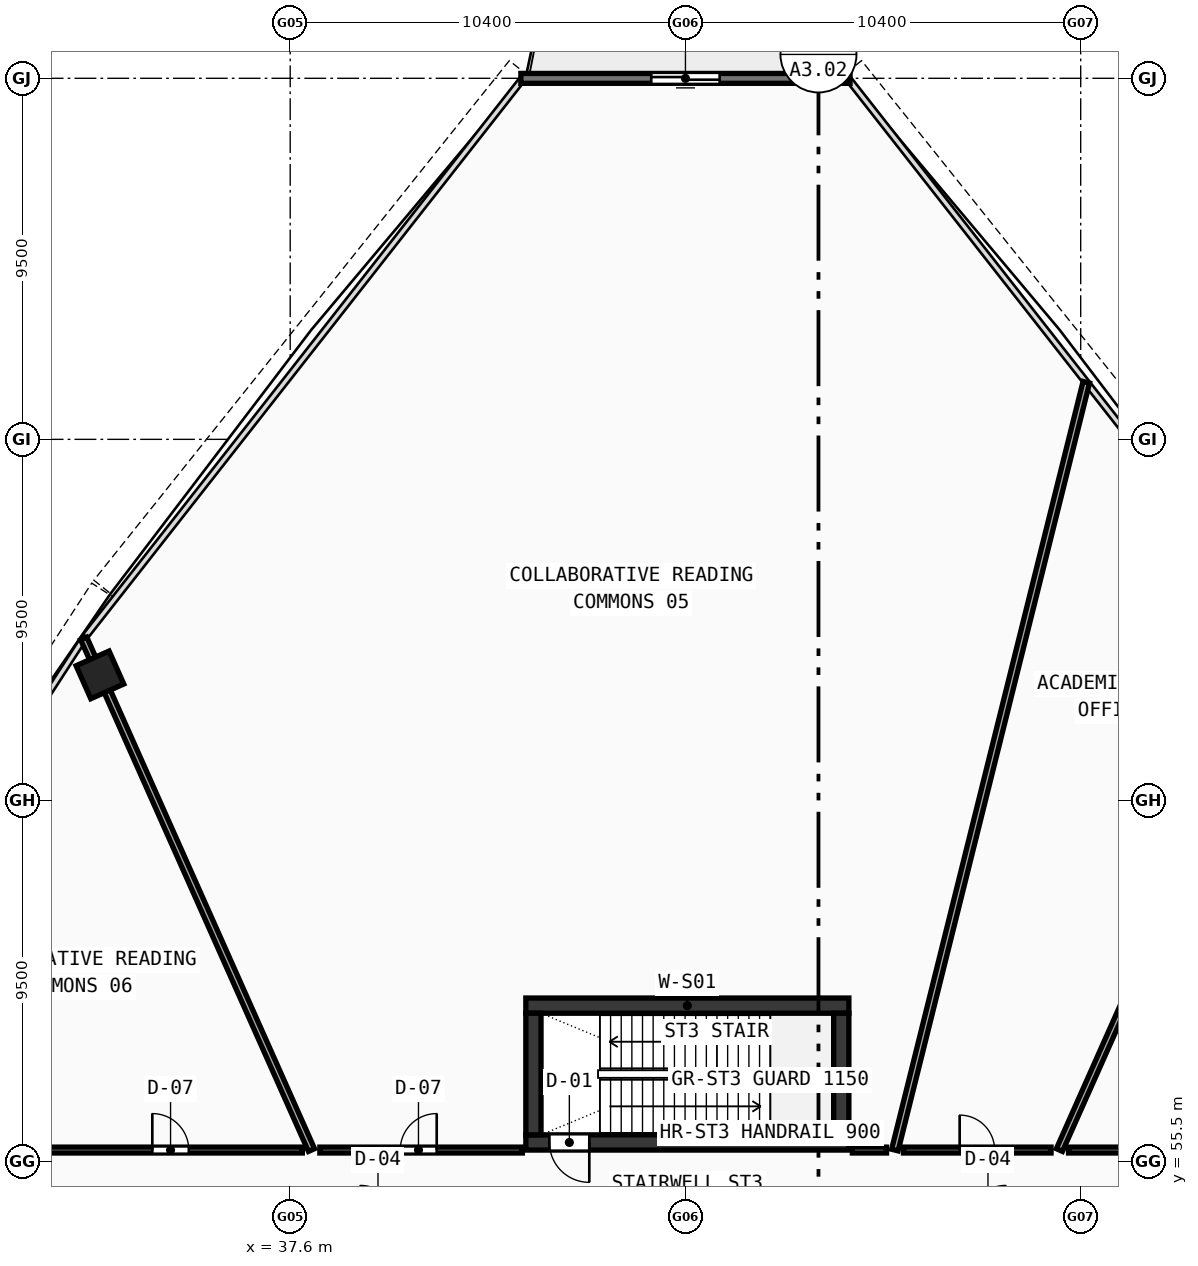
"""IFC4 building model, lengths in metres.
Left out: names, types, materials, properties, quantities, classifications, styles, units other than length and angle.
Written with IfcOpenShell. Run it as: python <this file> out.ifc"""

import sys

from ifc_helpers import new_model, si_unit, direction, frame, frame_2d, origin, origin_with_axes, origin_2d, place, context, subcontext, project, spatial, rectangle, hollow_rectangle, extrude, source, transform, mapped, element, fill, save


model = new_model("IFC4")
c1 = context("Model", 3, precision=1e-05, world=origin(), true_north=direction((0.0, 1.0)))
c2 = subcontext(c1, "Body", "Model", "MODEL_VIEW")
j1 = project(units=[si_unit("LENGTHUNIT", "METRE"), si_unit("PLANEANGLEUNIT", "RADIAN")], contexts=[c1])
p1 = place(None, origin())
s1 = spatial("IfcSite", under=j1, at=p1, CompositionType="ELEMENT")
p2 = place(p1, origin())
s2 = spatial("IfcBuilding", under=s1, at=p2, CompositionType="ELEMENT")
p3 = place(p2, frame((0.0, 0.0, 170.31)))
s3 = spatial("IfcBuildingStorey", under=s2, at=p3, CompositionType="ELEMENT", Elevation=170.31)
p4 = place(p3, frame((43.8, 59.6, 0.0), z_axis=(0.0, 0.0, 1.0), x_axis=(1.0, 0.0, 0.0)))
e1 = element("IfcWall", 1, at=p4, inside=s3, PredefinedType="SHEAR", context=c2, shape_type="SweptSolid", body=[
    extrude(rectangle(XDim=8.5, YDim=0.4, at=frame_2d((4.25, 0.0))), origin(), (0.0, 0.0, 1.0), 5.57),
])
p5 = place(p3, frame((43.8, 56.0, 0.0), z_axis=(0.0, 0.0, 1.0), x_axis=(1.0, 0.0, 0.0)))
e2 = element("IfcWall", 2, at=p5, inside=s3, PredefinedType="SHEAR", context=c2, shape_type="SweptSolid", body=[
    extrude(rectangle(XDim=8.5, YDim=0.4, at=frame_2d((4.25, 0.0))), origin(), (0.0, 0.0, 1.0), 5.57),
])
p6 = place(p5, frame((0.62, 0.0, 0.0)))
e3 = element("IfcOpeningElement", 3, at=p6, cuts=e2, PredefinedType="OPENING", context=c2, shape_type="SweptSolid", body=[
    extrude(rectangle(XDim=1.05, YDim=2.1, at=frame_2d((0.525, 1.05))), frame((0.0, 0.21, 0.0), z_axis=(0.0, -1.0, 0.0), x_axis=(1.0, 0.0, 0.0)), (0.0, 0.0, 1.0), 0.42),
])
for number, where, z_axis, x_axis in (
    (4, (44.0, 56.2, 0.0), (0.0, 0.0, 1.0), (0.0, 1.0, 0.0)),
    (5, (52.1, 56.2, 0.0), (0.0, 0.0, 1.0), (0.0, 1.0, 0.0)),
):
    element("IfcWall", number, at=place(p3, frame(where, z_axis=z_axis, x_axis=x_axis)), inside=s3, PredefinedType="SHEAR", context=c2, shape_type="SweptSolid", body=[
        extrude(rectangle(XDim=3.2, YDim=0.4, at=frame_2d((1.6, 0.0))), origin(), (0.0, 0.0, 1.0), 5.57),
    ])
m1 = source(origin(), c2, "Body", "SweptSolid", [
    extrude(hollow_rectangle(XDim=0.95, YDim=0.95, WallThickness=0.04, at=origin_2d()), origin(), (0.0, 0.0, 1.0), 5.83),
])
p7 = place(p3, frame((32.594, 68.303, -0.26), z_axis=(0.0, 0.0, 1.0), x_axis=(-0.913545457643, -0.406736643076, 0.0)))
e6 = element("IfcColumn", 6, at=p7, inside=s3, PredefinedType="COLUMN", context=c2, shape_type="MappedRepresentation", body=[
    mapped(m1, transform((0.0, 0.0, 0.0), scale=1.0)),
])
p8 = place(p3, frame((52.331, 83.998, 0.0), z_axis=(0.0, 0.0, 1.0), x_axis=(-1.0, 0.0, 0.0)))
e7 = element("IfcWall", 7, at=p8, inside=s3, PredefinedType="STANDARD", context=c2, shape_type="SweptSolid", body=[
    extrude(rectangle(XDim=8.661, YDim=0.26, at=frame_2d((4.331, 0.0))), origin(), (0.0, 0.0, 1.0), 5.57),
])
p9 = place(p8, frame((3.431, 0.0, 0.0)))
e8 = element("IfcOpeningElement", 8, at=p9, cuts=e7, PredefinedType="OPENING", context=c2, shape_type="SweptSolid", body=[
    extrude(rectangle(XDim=1.8, YDim=2.15, at=frame_2d((0.9, 1.075))), frame((0.0, 0.14, 0.0), z_axis=(0.0, -1.0, 0.0), x_axis=(1.0, 0.0, 0.0)), (0.0, 0.0, 1.0), 0.28),
])
p10 = place(p3, frame((57.84, 55.8, 0.0), z_axis=(0.0, 0.0, 1.0), x_axis=(0.406737891531, 0.913544901793, 0.0)))
e9 = element("IfcWall", 9, at=p10, inside=s3, PredefinedType="PARTITIONING", context=c2, shape_type="SweptSolid", body=[
    extrude(rectangle(XDim=14.736, YDim=0.175, at=frame_2d((7.368, 0.0))), origin(), (0.0, 0.0, 1.0), 2.22),
])
p11 = place(p3, frame((53.51, 55.8, 0.0), z_axis=(0.0, 0.0, 1.0), x_axis=(0.241934095485, 0.970292684422, 0.0)))
e10 = element("IfcWall", 10, at=p11, inside=s3, PredefinedType="PARTITIONING", context=c2, shape_type="SweptSolid", body=[
    extrude(rectangle(XDim=20.82, YDim=0.175, at=frame_2d((10.41, 0.0))), origin(), (0.0, 0.0, 1.0), 4.92),
])
p12 = place(p3, frame((38.16, 55.8, 0.0), z_axis=(0.0, 0.0, 1.0), x_axis=(-0.406737891531, 0.913544901793, 0.0)))
e11 = element("IfcWall", 11, at=p12, inside=s3, PredefinedType="PARTITIONING", context=c2, shape_type="SweptSolid", body=[
    extrude(rectangle(XDim=14.736, YDim=0.175, at=frame_2d((7.368, 0.0))), origin(), (0.0, 0.0, 1.0), 2.22),
])
p13 = place(p3, frame((30.953, 55.8, 0.0), z_axis=(0.0, 0.0, 1.0), x_axis=(1.0, 0.0, 0.0)))
e12 = element("IfcWall", 12, at=p13, inside=s3, PredefinedType="PARTITIONING", context=c2, shape_type="SweptSolid", body=[
    extrude(rectangle(XDim=6.966, YDim=0.155, at=frame_2d((3.483, 0.0))), origin(), (0.0, 0.0, 1.0), 2.22),
])
p14 = place(p13, frame((3.019, 0.0, 0.0)))
e13 = element("IfcOpeningElement", 13, at=p14, cuts=e12, PredefinedType="OPENING", context=c2, shape_type="SweptSolid", body=[
    extrude(rectangle(XDim=0.96, YDim=2.12, at=frame_2d((0.48, 1.06))), frame((0.0, 0.087, 0.0), z_axis=(0.0, -1.0, 0.0), x_axis=(1.0, 0.0, 0.0)), (0.0, 0.0, 1.0), 0.175),
])
p15 = place(p3, frame((38.38, 55.8, 0.0), z_axis=(0.0, 0.0, 1.0), x_axis=(1.0, 0.0, 0.0)))
e14 = element("IfcWall", 14, at=p15, inside=s3, PredefinedType="PARTITIONING", context=c2, shape_type="SweptSolid", body=[
    extrude(rectangle(XDim=5.329, YDim=0.155, at=frame_2d((2.665, 0.0))), origin(), (0.0, 0.0, 1.0), 2.22),
])
p16 = place(p15, frame((2.115, 0.0, 0.0)))
e15 = element("IfcOpeningElement", 15, at=p16, cuts=e14, PredefinedType="OPENING", context=c2, shape_type="SweptSolid", body=[
    extrude(rectangle(XDim=0.96, YDim=2.12, at=frame_2d((0.48, 1.06))), frame((0.0, 0.087, 0.0), z_axis=(0.0, -1.0, 0.0), x_axis=(1.0, 0.0, 0.0)), (0.0, 0.0, 1.0), 0.175),
])
p17 = place(p3, frame((52.391, 55.8, 0.0), z_axis=(0.0, 0.0, 1.0), x_axis=(1.0, 0.0, 0.0)))
e16 = element("IfcWall", 16, at=p17, inside=s3, PredefinedType="PARTITIONING", context=c2, shape_type="SweptSolid", body=[
    extrude(rectangle(XDim=0.899, YDim=0.155, at=frame_2d((0.45, 0.0))), origin(), (0.0, 0.0, 1.0), 5.57),
])
p18 = place(p3, frame((53.737, 55.8, 0.0), z_axis=(0.0, 0.0, 1.0), x_axis=(1.0, 0.0, 0.0)))
e17 = element("IfcWall", 17, at=p18, inside=s3, PredefinedType="PARTITIONING", context=c2, shape_type="SweptSolid", body=[
    extrude(rectangle(XDim=3.883, YDim=0.155, at=frame_2d((1.941, 0.0))), origin(), (0.0, 0.0, 1.0), 2.22),
])
p19 = place(p18, frame((1.478, 0.0, 0.0)))
e18 = element("IfcOpeningElement", 18, at=p19, cuts=e17, PredefinedType="OPENING", context=c2, shape_type="SweptSolid", body=[
    extrude(rectangle(XDim=0.92, YDim=2.1, at=frame_2d((0.46, 1.05))), frame((0.0, 0.087, 0.0), z_axis=(0.0, -1.0, 0.0), x_axis=(1.0, 0.0, 0.0)), (0.0, 0.0, 1.0), 0.175),
])
p20 = place(p3, frame((58.08, 55.8, 0.0), z_axis=(0.0, 0.0, 1.0), x_axis=(1.0, 0.0, 0.0)))
e19 = element("IfcWall", 19, at=p20, inside=s3, PredefinedType="PARTITIONING", context=c2, shape_type="SweptSolid", body=[
    extrude(rectangle(XDim=8.32, YDim=0.155, at=frame_2d((4.16, 0.0))), origin(), (0.0, 0.0, 1.0), 2.22),
])
p21 = place(p20, frame((3.809, 0.0, 0.0)))
e20 = element("IfcOpeningElement", 20, at=p21, cuts=e19, PredefinedType="OPENING", context=c2, shape_type="SweptSolid", body=[
    extrude(rectangle(XDim=0.92, YDim=2.1, at=frame_2d((0.46, 1.05))), frame((0.0, 0.087, 0.0), z_axis=(0.0, -1.0, 0.0), x_axis=(1.0, 0.0, 0.0)), (0.0, 0.0, 1.0), 0.175),
])
m2 = source(origin(), c2, "Body", "SweptSolid", [
    extrude(rectangle(XDim=1.8, YDim=2.15, at=frame_2d((0.9, 1.075))), frame((0.0, 0.025, 0.0), z_axis=(0.0, -1.0, 0.0), x_axis=(1.0, 0.0, 0.0)), (0.0, 0.0, 1.0), 0.05),
])
p22 = place(p9, origin_with_axes())
e21 = element("IfcDoor", 21, at=p22, inside=s3, OperationType="DOUBLE_DOOR_SLIDING", PredefinedType="DOOR", context=c2, shape_type="MappedRepresentation", body=[
    mapped(m2, transform((0.0, 0.0, 0.0), scale=1.0)),
])
fill(e8, e21)
m3 = source(origin(), c2, "Body", "SweptSolid", [
    extrude(rectangle(XDim=1.05, YDim=2.1, at=frame_2d((0.525, 1.05))), frame((0.0, 0.025, 0.0), z_axis=(0.0, -1.0, 0.0), x_axis=(1.0, 0.0, 0.0)), (0.0, 0.0, 1.0), 0.05),
])
p23 = place(p6, frame((1.05, 0.0, 0.0), z_axis=(0.0, 0.0, 1.0), x_axis=(-1.0, 0.0, 0.0)))
e22 = element("IfcDoor", 22, at=p23, inside=s3, OperationType="SINGLE_SWING_LEFT", PredefinedType="DOOR", context=c2, shape_type="MappedRepresentation", body=[
    mapped(m3, transform((0.0, 0.0, 0.0), scale=1.0)),
])
fill(e3, e22)
m4 = source(origin(), c2, "Body", "SweptSolid", [
    extrude(rectangle(XDim=0.92, YDim=2.1, at=frame_2d((0.46, 1.05))), frame((0.0, 0.025, 0.0), z_axis=(0.0, -1.0, 0.0), x_axis=(1.0, 0.0, 0.0)), (0.0, 0.0, 1.0), 0.05),
])
p24 = place(p19, origin_with_axes())
e23 = element("IfcDoor", 23, at=p24, inside=s3, OperationType="SINGLE_SWING_LEFT", PredefinedType="DOOR", context=c2, shape_type="MappedRepresentation", body=[
    mapped(m4, transform((0.0, 0.0, 0.0), scale=1.0)),
])
fill(e18, e23)
m5 = source(origin(), c2, "Body", "SweptSolid", [
    extrude(rectangle(XDim=0.96, YDim=2.12, at=frame_2d((0.48, 1.06))), frame((0.0, 0.025, 0.0), z_axis=(0.0, -1.0, 0.0), x_axis=(1.0, 0.0, 0.0)), (0.0, 0.0, 1.0), 0.05),
])
p25 = place(p16, origin_with_axes())
e24 = element("IfcDoor", 24, at=p25, inside=s3, OperationType="SINGLE_SWING_RIGHT", PredefinedType="DOOR", context=c2, shape_type="MappedRepresentation", body=[
    mapped(m5, transform((0.0, 0.0, 0.0), scale=1.0)),
])
fill(e15, e24)
p26 = place(p14, origin_with_axes())
e25 = element("IfcDoor", 25, at=p26, inside=s3, OperationType="SINGLE_SWING_LEFT", PredefinedType="DOOR", context=c2, shape_type="MappedRepresentation", body=[
    mapped(m5, transform((0.0, 0.0, 0.0), scale=1.0)),
])
fill(e13, e25)
save(model, sys.argv[1])
